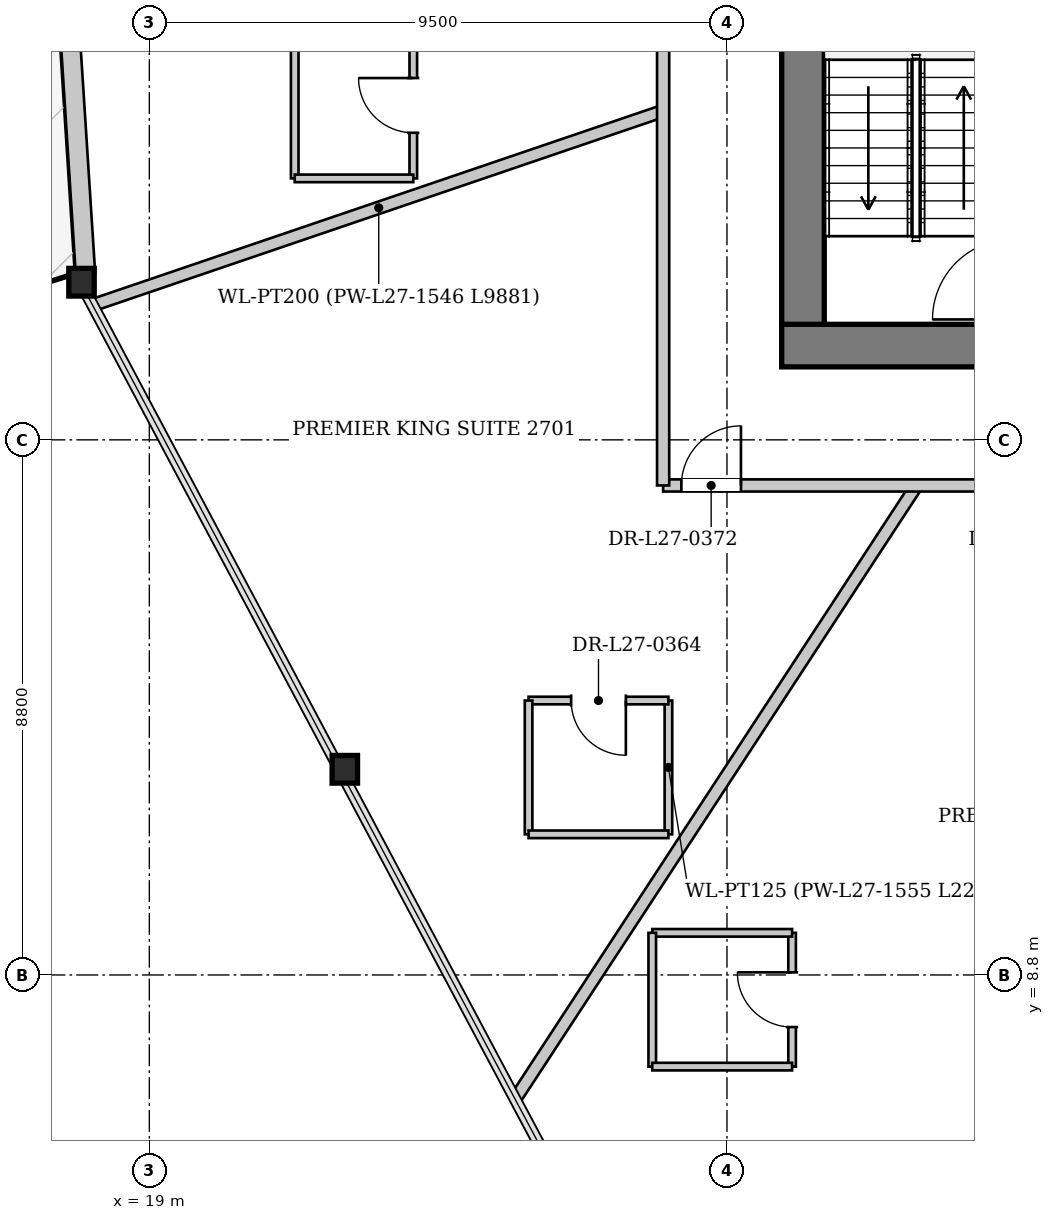
"""IFC4 building model, lengths in metres.
Left out: names, types, materials, properties, quantities, classifications, styles, units other than length and angle.
Written with IfcOpenShell. Run it as: python <this file> out.ifc"""

import sys

from ifc_helpers import new_model, si_unit, direction, frame, frame_2d, origin, origin_2d, place, context, subcontext, project, spatial, rectangle, i_section, extrude, source, transform, mapped, element, fill, save


model = new_model("IFC4")
c1 = context("Model", 3, precision=1e-05, world=origin(), true_north=direction((0.0, 1.0)))
c2 = subcontext(c1, "Body", "Model", "MODEL_VIEW")
j1 = project(units=[si_unit("LENGTHUNIT", "METRE"), si_unit("PLANEANGLEUNIT", "RADIAN")], contexts=[c1])
p1 = place(None, origin())
s1 = spatial("IfcSite", under=j1, at=p1, CompositionType="ELEMENT")
p2 = place(p1, origin())
s2 = spatial("IfcBuilding", under=s1, at=p2, CompositionType="ELEMENT")
p3 = place(p2, frame((0.0, 0.0, 105.7)))
s3 = spatial("IfcBuildingStorey", under=s2, at=p3, CompositionType="ELEMENT", Elevation=105.7)
m1 = source(origin(), c2, "Body", "SweptSolid", [
    extrude(i_section(OverallWidth=0.418, OverallDepth=0.455, WebThickness=0.038, FlangeThickness=0.059, at=origin_2d()), origin(), (0.0, 0.0, 1.0), 3.403),
])
p4 = place(p3, frame((17.789, 20.337, 0.0), z_axis=(0.056108980358, -0.084737475451, 0.994822266828), x_axis=(0.833784053008, 0.552090710798, 0.0)))
e1 = element("IfcColumn", 1, at=p4, inside=s3, PredefinedType="COLUMN", context=c2, shape_type="MappedRepresentation", body=[
    mapped(m1, transform((0.0, 0.0, 0.0), x_axis=(1.0, 0.0, 0.0), y_axis=(0.0, 1.0, 0.0), z_axis=(0.0, 0.0, 1.0), scale=1.0)),
])
m2 = source(origin(), c2, "Body", "SweptSolid", [
    extrude(i_section(OverallWidth=0.418, OverallDepth=0.455, WebThickness=0.038, FlangeThickness=0.059, at=origin_2d()), origin(), (0.0, 0.0, 1.0), 3.405),
])
p5 = place(p3, frame((22.069, 12.293, 0.0), z_axis=(0.085544136736, -0.065323309779, 0.994190658712), x_axis=(0.606905952287, 0.794773656508, 0.0)))
e2 = element("IfcColumn", 2, at=p5, inside=s3, PredefinedType="COLUMN", context=c2, shape_type="MappedRepresentation", body=[
    mapped(m2, transform((0.0, 0.0, 0.0), x_axis=(1.0, 0.0, 0.0), y_axis=(0.0, 1.0, 0.0), z_axis=(0.0, 0.0, 1.0), scale=1.0)),
])
p6 = place(p3, frame((51.807, 15.469, 0.0), z_axis=(0.0, 0.0, 1.0), x_axis=(-0.85050085658, -0.525973661847, 0.0)))
e3 = element("IfcWall", 3, at=p6, inside=s3, PredefinedType="SOLIDWALL", context=c2, shape_type="SweptSolid", body=[
    extrude(rectangle(XDim=23.985, YDim=0.32, at=frame_2d((11.993, 0.0))), origin(), (0.0, 0.0, 1.0), 2.692),
])
p7 = place(p6, frame((7.125, 0.0, 0.0)))
e4 = element("IfcOpeningElement", 4, at=p7, cuts=e3, PredefinedType="OPENING", context=c2, shape_type="SweptSolid", body=[
    extrude(rectangle(XDim=1.1, YDim=2.3, at=frame_2d((0.55, 1.15))), frame((0.0, 0.17, 0.0), z_axis=(0.0, -1.0, 0.0), x_axis=(1.0, 0.0, 0.0)), (0.0, 0.0, 1.0), 0.34),
])
p8 = place(p6, frame((16.849, 0.0, 0.372)))
e5 = element("IfcOpeningElement", 5, at=p8, cuts=e3, PredefinedType="OPENING", context=c2, shape_type="SweptSolid", body=[
    extrude(rectangle(XDim=1.8, YDim=2.2, at=frame_2d((0.9, 1.1))), frame((0.0, 0.17, 0.0), z_axis=(0.0, -1.0, 0.0), x_axis=(1.0, 0.0, 0.0)), (0.0, 0.0, 1.0), 0.34),
])
p9 = place(p3, frame((17.949, 20.347, 0.0), z_axis=(0.0, 0.0, 1.0), x_axis=(-0.06421657242, 0.997935985836, 0.0)))
e6 = element("IfcWall", 6, at=p9, inside=s3, PredefinedType="SOLIDWALL", context=c2, shape_type="SweptSolid", body=[
    extrude(rectangle(XDim=18.222, YDim=0.32, at=frame_2d((9.111, 0.0))), origin(), (0.0, 0.0, 1.0), 2.692),
])
p10 = place(p9, frame((5.281, 0.0, 0.0)))
e7 = element("IfcOpeningElement", 7, at=p10, cuts=e6, PredefinedType="OPENING", context=c2, shape_type="SweptSolid", body=[
    extrude(rectangle(XDim=1.1, YDim=2.3, at=frame_2d((0.55, 1.15))), frame((0.0, 0.17, 0.0), z_axis=(0.0, -1.0, 0.0), x_axis=(1.0, 0.0, 0.0)), (0.0, 0.0, 1.0), 0.34),
])
p11 = place(p9, frame((12.585, 0.0, 0.372)))
e8 = element("IfcOpeningElement", 8, at=p11, cuts=e6, PredefinedType="OPENING", context=c2, shape_type="SweptSolid", body=[
    extrude(rectangle(XDim=1.8, YDim=2.2, at=frame_2d((0.9, 1.1))), frame((0.0, 0.17, 0.0), z_axis=(0.0, -1.0, 0.0), x_axis=(1.0, 0.0, 0.0)), (0.0, 0.0, 1.0), 0.34),
])
p12 = place(p3, frame((46.6, 19.15, 0.0), z_axis=(0.0, 0.0, 1.0), x_axis=(-1.0, 0.0, 0.0)))
e9 = element("IfcWall", 9, at=p12, inside=s3, PredefinedType="SHEAR", context=c2, shape_type="SweptSolid", body=[
    extrude(rectangle(XDim=17.2, YDim=0.7, at=frame_2d((8.6, 0.0))), origin(), (0.0, 0.0, 1.0), 3.3),
])
p13 = place(p12, frame((4.8, 0.0, 0.0)))
e10 = element("IfcOpeningElement", 10, at=p13, cuts=e9, PredefinedType="OPENING", context=c2, shape_type="SweptSolid", body=[
    extrude(rectangle(XDim=1.12, YDim=2.25, at=frame_2d((0.56, 1.125))), frame((0.0, 0.36, 0.0), z_axis=(0.0, -1.0, 0.0), x_axis=(1.0, 0.0, 0.0)), (0.0, 0.0, 1.0), 0.72),
])
p14 = place(p12, frame((11.3, 0.0, 0.0)))
e11 = element("IfcOpeningElement", 11, at=p14, cuts=e9, PredefinedType="OPENING", context=c2, shape_type="SweptSolid", body=[
    extrude(rectangle(XDim=1.12, YDim=2.25, at=frame_2d((0.56, 1.125))), frame((0.0, 0.36, 0.0), z_axis=(0.0, -1.0, 0.0), x_axis=(1.0, 0.0, 0.0)), (0.0, 0.0, 1.0), 0.72),
])
p15 = place(p3, frame((29.75, 19.5, 0.0), z_axis=(0.0, 0.0, 1.0), x_axis=(0.0, 1.0, 0.0)))
e12 = element("IfcWall", 12, at=p15, inside=s3, PredefinedType="SHEAR", context=c2, shape_type="SweptSolid", body=[
    extrude(rectangle(XDim=14.2, YDim=0.7, at=frame_2d((7.1, 0.0))), origin(), (0.0, 0.0, 1.0), 3.3),
])
p16 = place(p15, frame((7.42, 0.0, 0.0)))
e13 = element("IfcOpeningElement", 13, at=p16, cuts=e12, PredefinedType="OPENING", context=c2, shape_type="SweptSolid", body=[
    extrude(rectangle(XDim=1.6, YDim=2.2, at=frame_2d((0.8, 1.1))), frame((0.0, 0.36, 0.0), z_axis=(0.0, -1.0, 0.0), x_axis=(1.0, 0.0, 0.0)), (0.0, 0.0, 1.0), 0.72),
])
p17 = place(p3, frame((27.45, 23.009, 0.0), z_axis=(0.0, 0.0, 1.0), x_axis=(-0.946652953051, -0.3222548471, 0.0)))
e14 = element("IfcWall", 14, at=p17, inside=s3, PredefinedType="PARTITIONING", context=c2, shape_type="SweptSolid", body=[
    extrude(rectangle(XDim=9.881, YDim=0.2, at=frame_2d((4.941, 0.0))), origin(), (0.0, 0.0, 1.0), 2.785),
])
p18 = place(p3, frame((31.62, 16.85, 0.0), z_axis=(0.0, 0.0, 1.0), x_axis=(-0.547573647932, -0.836757491804, 0.0)))
e15 = element("IfcWall", 15, at=p18, inside=s3, PredefinedType="PARTITIONING", context=c2, shape_type="SweptSolid", body=[
    extrude(rectangle(XDim=12.027, YDim=0.2, at=frame_2d((6.014, 0.0))), origin(), (0.0, 0.0, 1.0), 3.3),
])
p19 = place(p3, frame((27.537, 11.113, 0.0), z_axis=(0.0, 0.0, 1.0), x_axis=(0.0, 1.0, 0.0)))
e16 = element("IfcWall", 16, at=p19, inside=s3, PredefinedType="PARTITIONING", context=c2, shape_type="SweptSolid", body=[
    extrude(rectangle(XDim=2.2, YDim=0.125, at=frame_2d((1.1, 0.0))), origin(), (0.0, 0.0, 1.0), 3.3),
])
p20 = place(p3, frame((27.537, 13.313, 0.0), z_axis=(0.0, 0.0, 1.0), x_axis=(-1.0, 0.0, 0.0)))
e17 = element("IfcWall", 17, at=p20, inside=s3, PredefinedType="PARTITIONING", context=c2, shape_type="SweptSolid", body=[
    extrude(rectangle(XDim=2.3, YDim=0.125, at=frame_2d((1.15, 0.0))), origin(), (0.0, 0.0, 1.0), 3.3),
])
p21 = place(p20, frame((0.7, 0.0, 0.0)))
e18 = element("IfcOpeningElement", 18, at=p21, cuts=e17, PredefinedType="OPENING", context=c2, shape_type="SweptSolid", body=[
    extrude(rectangle(XDim=0.9, YDim=2.1, at=frame_2d((0.45, 1.05))), frame((0.0, 0.073, 0.0), z_axis=(0.0, -1.0, 0.0), x_axis=(1.0, 0.0, 0.0)), (0.0, 0.0, 1.0), 0.145),
])
p22 = place(p3, frame((25.237, 13.313, 0.0), z_axis=(0.0, 0.0, 1.0), x_axis=(0.0, -1.0, 0.0)))
e19 = element("IfcWall", 19, at=p22, inside=s3, PredefinedType="PARTITIONING", context=c2, shape_type="SweptSolid", body=[
    extrude(rectangle(XDim=2.2, YDim=0.125, at=frame_2d((1.1, 0.0))), origin(), (0.0, 0.0, 1.0), 3.3),
])
p23 = place(p3, frame((25.237, 11.113, 0.0), z_axis=(0.0, 0.0, 1.0), x_axis=(1.0, 0.0, 0.0)))
e20 = element("IfcWall", 20, at=p23, inside=s3, PredefinedType="PARTITIONING", context=c2, shape_type="SweptSolid", body=[
    extrude(rectangle(XDim=2.3, YDim=0.125, at=frame_2d((1.15, 0.0))), origin(), (0.0, 0.0, 1.0), 3.3),
])
p24 = place(p3, frame((29.571, 7.293, 0.0), z_axis=(0.0, 0.0, 1.0), x_axis=(0.0, 1.0, 0.0)))
e21 = element("IfcWall", 21, at=p24, inside=s3, PredefinedType="PARTITIONING", context=c2, shape_type="SweptSolid", body=[
    extrude(rectangle(XDim=2.2, YDim=0.125, at=frame_2d((1.1, 0.0))), origin(), (0.0, 0.0, 1.0), 2.795),
])
p25 = place(p24, frame((0.65, 0.0, 0.0)))
e22 = element("IfcOpeningElement", 22, at=p25, cuts=e21, PredefinedType="OPENING", context=c2, shape_type="SweptSolid", body=[
    extrude(rectangle(XDim=0.9, YDim=2.1, at=frame_2d((0.45, 1.05))), frame((0.0, 0.073, 0.0), z_axis=(0.0, -1.0, 0.0), x_axis=(1.0, 0.0, 0.0)), (0.0, 0.0, 1.0), 0.145),
])
p26 = place(p3, frame((29.571, 9.493, 0.0), z_axis=(0.0, 0.0, 1.0), x_axis=(-1.0, 0.0, 0.0)))
e23 = element("IfcWall", 23, at=p26, inside=s3, PredefinedType="PARTITIONING", context=c2, shape_type="SweptSolid", body=[
    extrude(rectangle(XDim=2.3, YDim=0.125, at=frame_2d((1.15, 0.0))), origin(), (0.0, 0.0, 1.0), 3.3),
])
p27 = place(p3, frame((27.271, 9.493, 0.0), z_axis=(0.0, 0.0, 1.0), x_axis=(0.0, -1.0, 0.0)))
e24 = element("IfcWall", 24, at=p27, inside=s3, PredefinedType="PARTITIONING", context=c2, shape_type="SweptSolid", body=[
    extrude(rectangle(XDim=2.2, YDim=0.125, at=frame_2d((1.1, 0.0))), origin(), (0.0, 0.0, 1.0), 3.3),
])
p28 = place(p3, frame((27.271, 7.293, 0.0), z_axis=(0.0, 0.0, 1.0), x_axis=(1.0, 0.0, 0.0)))
e25 = element("IfcWall", 25, at=p28, inside=s3, PredefinedType="PARTITIONING", context=c2, shape_type="SweptSolid", body=[
    extrude(rectangle(XDim=2.3, YDim=0.125, at=frame_2d((1.15, 0.0))), origin(), (0.0, 0.0, 1.0), 3.3),
])
p29 = place(p3, frame((23.341, 21.9, 0.0), z_axis=(0.0, 0.0, 1.0), x_axis=(0.0, 1.0, 0.0)))
e26 = element("IfcWall", 26, at=p29, inside=s3, PredefinedType="PARTITIONING", context=c2, shape_type="SweptSolid", body=[
    extrude(rectangle(XDim=2.4, YDim=0.125, at=frame_2d((1.2, 0.0))), origin(), (0.0, 0.0, 1.0), 3.3),
])
p30 = place(p29, frame((0.75, 0.0, 0.0)))
e27 = element("IfcOpeningElement", 27, at=p30, cuts=e26, PredefinedType="OPENING", context=c2, shape_type="SweptSolid", body=[
    extrude(rectangle(XDim=0.9, YDim=2.1, at=frame_2d((0.45, 1.05))), frame((0.0, 0.073, 0.0), z_axis=(0.0, -1.0, 0.0), x_axis=(1.0, 0.0, 0.0)), (0.0, 0.0, 1.0), 0.145),
])
p31 = place(p3, frame((21.391, 24.3, 0.0), z_axis=(0.0, 0.0, 1.0), x_axis=(0.0, -1.0, 0.0)))
e28 = element("IfcWall", 28, at=p31, inside=s3, PredefinedType="PARTITIONING", context=c2, shape_type="SweptSolid", body=[
    extrude(rectangle(XDim=2.4, YDim=0.125, at=frame_2d((1.2, 0.0))), origin(), (0.0, 0.0, 1.0), 3.3),
])
p32 = place(p3, frame((21.391, 21.9, 0.0), z_axis=(0.0, 0.0, 1.0), x_axis=(1.0, 0.0, 0.0)))
e29 = element("IfcWall", 29, at=p32, inside=s3, PredefinedType="PARTITIONING", context=c2, shape_type="SweptSolid", body=[
    extrude(rectangle(XDim=1.95, YDim=0.125, at=frame_2d((0.975, 0.0))), origin(), (0.0, 0.0, 1.0), 2.785),
])
p33 = place(p3, frame((27.45, 16.85, 0.0), z_axis=(0.0, 0.0, 1.0), x_axis=(1.0, 0.0, 0.0)))
e30 = element("IfcWall", 30, at=p33, inside=s3, PredefinedType="PARTITIONING", context=c2, shape_type="SweptSolid", body=[
    extrude(rectangle(XDim=21.1, YDim=0.2, at=frame_2d((10.55, 0.0))), origin(), (0.0, 0.0, 1.0), 3.045),
])
p34 = place(p33, frame((0.3, 0.0, 0.0)))
e31 = element("IfcOpeningElement", 31, at=p34, cuts=e30, PredefinedType="OPENING", context=c2, shape_type="SweptSolid", body=[
    extrude(rectangle(XDim=0.98, YDim=2.15, at=frame_2d((0.49, 1.075))), frame((0.0, 0.11, 0.0), z_axis=(0.0, -1.0, 0.0), x_axis=(1.0, 0.0, 0.0)), (0.0, 0.0, 1.0), 0.22),
])
p35 = place(p33, frame((6.227, 0.0, 0.0)))
e32 = element("IfcOpeningElement", 32, at=p35, cuts=e30, PredefinedType="OPENING", context=c2, shape_type="SweptSolid", body=[
    extrude(rectangle(XDim=0.98, YDim=2.15, at=frame_2d((0.49, 1.075))), frame((0.0, 0.11, 0.0), z_axis=(0.0, -1.0, 0.0), x_axis=(1.0, 0.0, 0.0)), (0.0, 0.0, 1.0), 0.22),
])
p36 = place(p33, frame((16.55, 0.0, 0.0)))
e33 = element("IfcOpeningElement", 33, at=p36, cuts=e30, PredefinedType="OPENING", context=c2, shape_type="SweptSolid", body=[
    extrude(rectangle(XDim=0.98, YDim=2.15, at=frame_2d((0.49, 1.075))), frame((0.0, 0.11, 0.0), z_axis=(0.0, -1.0, 0.0), x_axis=(1.0, 0.0, 0.0)), (0.0, 0.0, 1.0), 0.22),
])
p37 = place(p3, frame((27.45, 16.85, 0.0), z_axis=(0.0, 0.0, 1.0), x_axis=(0.0, 1.0, 0.0)))
e34 = element("IfcWall", 34, at=p37, inside=s3, PredefinedType="PARTITIONING", context=c2, shape_type="SweptSolid", body=[
    extrude(rectangle(XDim=19.5, YDim=0.2, at=frame_2d((9.75, 0.0))), origin(), (0.0, 0.0, 1.0), 3.3),
])
p38 = place(p37, frame((16.938, 0.0, 0.0)))
e35 = element("IfcOpeningElement", 35, at=p38, cuts=e34, PredefinedType="OPENING", context=c2, shape_type="SweptSolid", body=[
    extrude(rectangle(XDim=0.98, YDim=2.15, at=frame_2d((0.49, 1.075))), frame((0.0, 0.11, 0.0), z_axis=(0.0, -1.0, 0.0), x_axis=(1.0, 0.0, 0.0)), (0.0, 0.0, 1.0), 0.22),
])
p39 = place(p37, frame((9.597, 0.0, 0.0)))
e36 = element("IfcOpeningElement", 36, at=p39, cuts=e34, PredefinedType="OPENING", context=c2, shape_type="SweptSolid", body=[
    extrude(rectangle(XDim=0.98, YDim=2.15, at=frame_2d((0.49, 1.075))), frame((0.0, 0.11, 0.0), z_axis=(0.0, -1.0, 0.0), x_axis=(1.0, 0.0, 0.0)), (0.0, 0.0, 1.0), 0.22),
])
m3 = source(origin(), c2, "Body", "SweptSolid", [
    extrude(rectangle(XDim=0.9, YDim=2.1, at=frame_2d((0.45, 1.05))), frame((0.0, 0.025, 0.0), z_axis=(0.0, -1.0, 0.0), x_axis=(1.0, 0.0, 0.0)), (0.0, 0.0, 1.0), 0.05),
])
p40 = place(p21, origin())
e37 = element("IfcDoor", 37, at=p40, inside=s3, OperationType="SINGLE_SWING_LEFT", PredefinedType="DOOR", context=c2, shape_type="MappedRepresentation", body=[
    mapped(m3, transform((0.0, 0.0, 0.0), x_axis=(1.0, 0.0, 0.0), y_axis=(0.0, 1.0, 0.0), z_axis=(0.0, 0.0, 1.0), scale=1.0)),
])
fill(e18, e37)
p41 = place(p25, origin())
e38 = element("IfcDoor", 38, at=p41, inside=s3, OperationType="SINGLE_SWING_RIGHT", PredefinedType="DOOR", context=c2, shape_type="MappedRepresentation", body=[
    mapped(m3, transform((0.0, 0.0, 0.0), x_axis=(1.0, 0.0, 0.0), y_axis=(0.0, 1.0, 0.0), z_axis=(0.0, 0.0, 1.0), scale=1.0)),
])
fill(e22, e38)
p42 = place(p30, origin())
e39 = element("IfcDoor", 39, at=p42, inside=s3, OperationType="SINGLE_SWING_RIGHT", PredefinedType="DOOR", context=c2, shape_type="MappedRepresentation", body=[
    mapped(m3, transform((0.0, 0.0, 0.0), x_axis=(1.0, 0.0, 0.0), y_axis=(0.0, 1.0, 0.0), z_axis=(0.0, 0.0, 1.0), scale=1.0)),
])
fill(e27, e39)
m4 = source(origin(), c2, "Body", "SweptSolid", [
    extrude(rectangle(XDim=0.98, YDim=2.15, at=frame_2d((0.49, 1.075))), frame((0.0, 0.025, 0.0), z_axis=(0.0, -1.0, 0.0), x_axis=(1.0, 0.0, 0.0)), (0.0, 0.0, 1.0), 0.05),
])
p43 = place(p34, origin())
e40 = element("IfcDoor", 40, at=p43, inside=s3, OperationType="SINGLE_SWING_RIGHT", PredefinedType="DOOR", context=c2, shape_type="MappedRepresentation", body=[
    mapped(m4, transform((0.0, 0.0, 0.0), x_axis=(1.0, 0.0, 0.0), y_axis=(0.0, 1.0, 0.0), z_axis=(0.0, 0.0, 1.0), scale=1.0)),
])
fill(e31, e40)
save(model, sys.argv[1])
